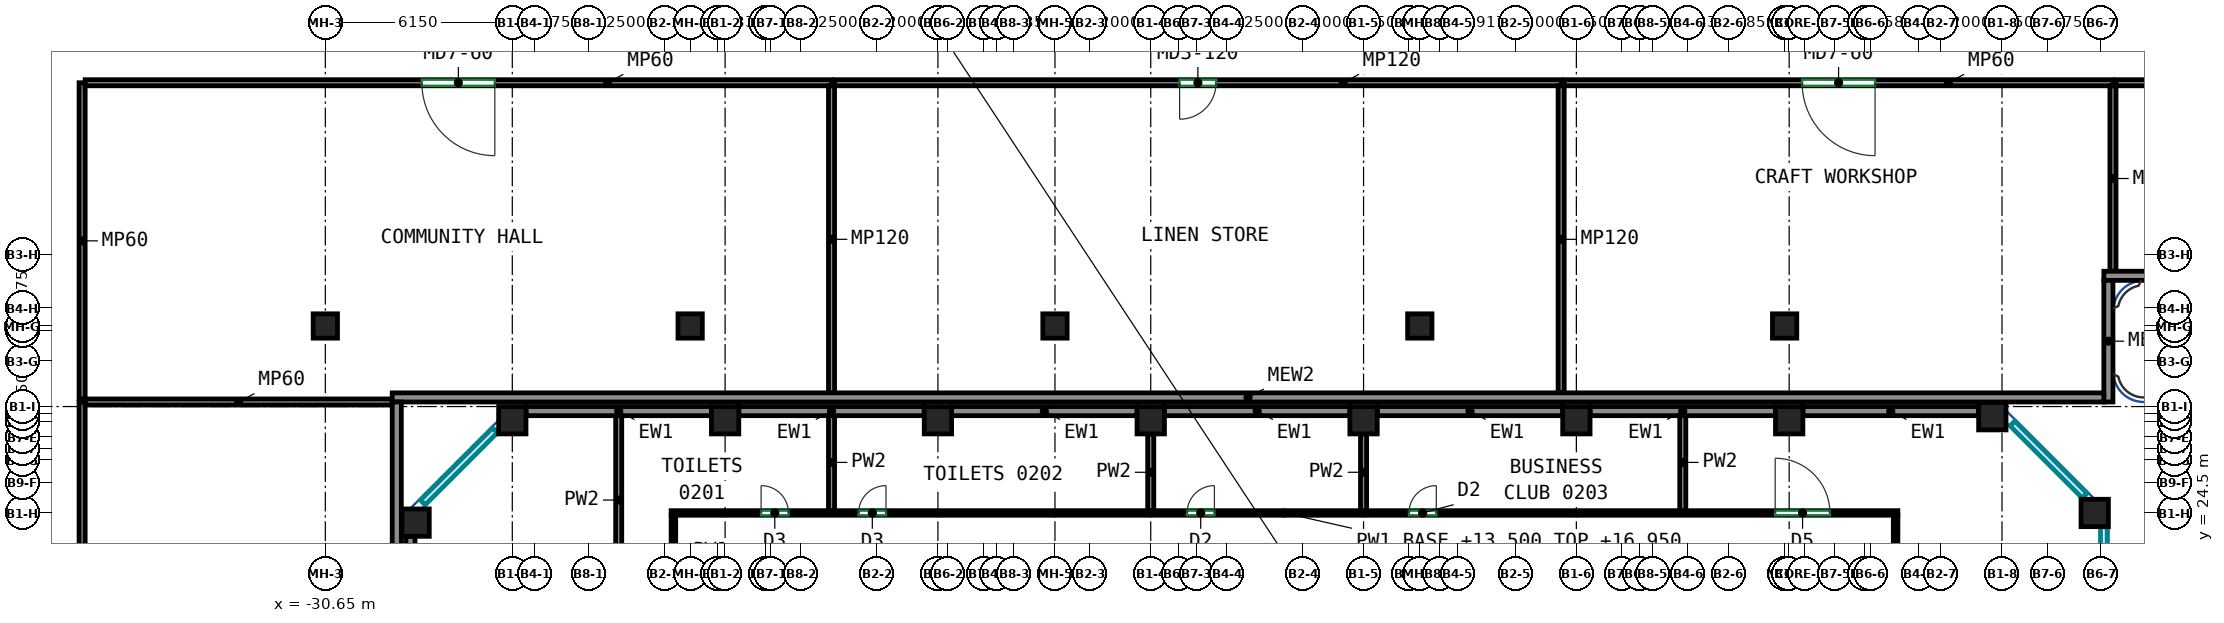
"""IFC4 building model, lengths in metres.
Left out: names, types, materials, properties, quantities, classifications, styles, units other than length and angle.
Written with IfcOpenShell. Run it as: python <this file> out.ifc"""

import sys

from ifc_helpers import new_model, si_unit, direction, frame, frame_2d, origin, origin_2d, place, context, subcontext, project, spatial, rectangle, extrude, source, transform, mapped, element, fill, save


model = new_model("IFC4")
c1 = context("Model", 3, precision=1e-05, world=origin(), true_north=direction((0.0, 1.0)))
c2 = subcontext(c1, "Body", "Model", "MODEL_VIEW")
j1 = project(units=[si_unit("LENGTHUNIT", "METRE"), si_unit("PLANEANGLEUNIT", "RADIAN")], contexts=[c1])
p1 = place(None, origin())
s1 = spatial("IfcSite", under=j1, at=p1, CompositionType="ELEMENT")
p2 = place(p1, origin())
s2 = spatial("IfcBuilding", under=s1, at=p2, CompositionType="ELEMENT")
p3 = place(p2, frame((0.0, 0.0, 13.5)))
s3 = spatial("IfcBuildingStorey", under=s2, at=p3, CompositionType="ELEMENT", Elevation=13.5)
m1 = source(origin(), c2, "Body", "SweptSolid", [
    extrude(rectangle(XDim=0.9, YDim=0.9, at=origin_2d()), origin(), (0.0, 0.0, 1.0), 4.1),
])
for number, where, z_axis, x_axis in (
    (1, (-27.682, 24.182, 0.0), (0.0, 0.0, 1.0), (1.0, 0.0, 0.0)),
    (2, (-24.5, 27.55, 0.0), (0.0, 0.0, 1.0), (1.0, 0.0, 0.0)),
    (3, (-17.5, 27.55, 0.0), (0.0, 0.0, 1.0), (1.0, 0.0, 0.0)),
    (4, (-10.5, 27.55, 0.0), (0.0, 0.0, 1.0), (1.0, 0.0, 0.0)),
    (5, (-3.5, 27.55, 0.0), (0.0, 0.0, 1.0), (1.0, 0.0, 0.0)),
    (6, (3.5, 27.55, 0.0), (0.0, 0.0, 1.0), (1.0, 0.0, 0.0)),
    (7, (10.5, 27.55, 0.0), (0.0, 0.0, 1.0), (1.0, 0.0, 0.0)),
    (8, (17.5, 27.55, 0.0), (0.0, 0.0, 1.0), (1.0, 0.0, 0.0)),
    (9, (24.182, 27.682, 0.0), (0.0, 0.0, 1.0), (1.0, 0.0, 0.0)),
    (10, (27.55, 24.5, 0.0), (0.0, 0.0, 1.0), (1.0, 0.0, 0.0)),
):
    element("IfcColumn", number, at=place(p3, frame(where, z_axis=z_axis, x_axis=x_axis)), inside=s3, PredefinedType="COLUMN", context=c2, shape_type="MappedRepresentation", body=[
        mapped(m1, transform((0.0, 0.0, 0.0))),
    ])
m2 = source(origin(), c2, "Body", "SweptSolid", [
    extrude(rectangle(XDim=0.8, YDim=0.8, at=origin_2d()), origin(), (0.0, 0.0, 1.0), 4.1),
])
for number, where, z_axis, x_axis in (
    (11, (-30.65, 30.65, 0.0), (0.0, 0.0, 1.0), (1.0, 0.0, 0.0)),
    (12, (-18.65, 30.65, 0.0), (0.0, 0.0, 1.0), (1.0, 0.0, 0.0)),
    (13, (-6.65, 30.65, 0.0), (0.0, 0.0, 1.0), (1.0, 0.0, 0.0)),
    (14, (5.35, 30.65, 0.0), (0.0, 0.0, 1.0), (1.0, 0.0, 0.0)),
    (15, (17.35, 30.65, 0.0), (0.0, 0.0, 1.0), (1.0, 0.0, 0.0)),
):
    element("IfcColumn", number, at=place(p3, frame(where, z_axis=z_axis, x_axis=x_axis)), inside=s3, PredefinedType="COLUMN", context=c2, shape_type="MappedRepresentation", body=[
        mapped(m2, transform((0.0, 0.0, 0.0))),
    ])
m3 = source(origin(), c2, "Body", "SweptSolid", [
    extrude(rectangle(XDim=5.782, YDim=0.3, at=frame_2d((2.891, 0.0))), origin(), (0.0, 0.0, 1.0), 4.1),
])
p4 = place(p3, frame((23.732, 27.85, 0.0), z_axis=(0.0, 0.0, 1.0), x_axis=(-1.0, 0.0, 0.0)))
e16 = element("IfcWall", 16, at=p4, inside=s3, PredefinedType="SOLIDWALL", context=c2, shape_type="MappedRepresentation", body=[
    mapped(m3, transform((0.0, 0.0, 0.0))),
])
m4 = source(origin(), c2, "Body", "SweptSolid", [
    extrude(rectangle(XDim=6.1, YDim=0.3, at=frame_2d((3.05, 0.0))), origin(), (0.0, 0.0, 1.0), 4.1),
])
for number, where, z_axis, x_axis in (
    (17, (17.05, 27.85, 0.0), (0.0, 0.0, 1.0), (-1.0, 0.0, 0.0)),
    (18, (10.05, 27.85, 0.0), (0.0, 0.0, 1.0), (-1.0, 0.0, 0.0)),
    (19, (3.05, 27.85, 0.0), (0.0, 0.0, 1.0), (-1.0, 0.0, 0.0)),
    (20, (-3.95, 27.85, 0.0), (0.0, 0.0, 1.0), (-1.0, 0.0, 0.0)),
    (21, (-10.95, 27.85, 0.0), (0.0, 0.0, 1.0), (-1.0, 0.0, 0.0)),
    (22, (-17.95, 27.85, 0.0), (0.0, 0.0, 1.0), (-1.0, 0.0, 0.0)),
):
    element("IfcWall", number, at=place(p3, frame(where, z_axis=z_axis, x_axis=x_axis)), inside=s3, PredefinedType="SOLIDWALL", context=c2, shape_type="MappedRepresentation", body=[
        mapped(m4, transform((0.0, 0.0, 0.0))),
    ])
m5 = source(origin(), c2, "Body", "SweptSolid", [
    extrude(rectangle(XDim=15.282, YDim=0.3, at=frame_2d((7.641, 0.0))), origin(), (0.0, 0.0, 1.0), 4.1),
])
p5 = place(p3, frame((-27.85, 23.732, 0.0), z_axis=(0.0, 0.0, 1.0), x_axis=(0.0, -1.0, 0.0)))
e23 = element("IfcWall", 23, at=p5, inside=s3, PredefinedType="SOLIDWALL", context=c2, shape_type="MappedRepresentation", body=[
    mapped(m5, transform((0.0, 0.0, 0.0))),
])
m6 = source(origin(), c2, "Body", "SweptSolid", [
    extrude(rectangle(XDim=27.7, YDim=0.3, at=frame_2d((13.85, 0.0))), origin(), (0.0, 0.0, 1.0), 4.1),
])
p6 = place(p3, frame((55.55, 32.3, 0.0), z_axis=(0.0, 0.0, 1.0), x_axis=(-1.0, 0.0, 0.0)))
e24 = element("IfcWall", 24, at=p6, inside=s3, PredefinedType="SOLIDWALL", context=c2, shape_type="MappedRepresentation", body=[
    mapped(m6, transform((0.0, 0.0, 0.0))),
])
p7 = place(p6, frame((7.11, 0.0, 0.0)))
e25 = element("IfcOpeningElement", 25, at=p7, cuts=e24, PredefinedType="OPENING", context=c2, shape_type="SweptSolid", body=[
    extrude(rectangle(XDim=2.4, YDim=2.4, at=frame_2d((1.2, 1.2))), frame((0.0, 0.16, 0.0), z_axis=(0.0, -1.0, 0.0), x_axis=(1.0, 0.0, 0.0)), (0.0, 0.0, 1.0), 0.32),
])
p8 = place(p6, frame((18.19, 0.0, 0.0)))
e26 = element("IfcOpeningElement", 26, at=p8, cuts=e24, PredefinedType="OPENING", context=c2, shape_type="SweptSolid", body=[
    extrude(rectangle(XDim=2.4, YDim=2.4, at=frame_2d((1.2, 1.2))), frame((0.0, 0.16, 0.0), z_axis=(0.0, -1.0, 0.0), x_axis=(1.0, 0.0, 0.0)), (0.0, 0.0, 1.0), 0.32),
])
p9 = place(p6, frame((2.65, 0.0, 0.9)))
e27 = element("IfcOpeningElement", 27, at=p9, cuts=e24, PredefinedType="OPENING", context=c2, shape_type="SweptSolid", body=[
    extrude(rectangle(XDim=2.4, YDim=1.8, at=frame_2d((1.2, 0.9))), frame((0.0, 0.16, 0.0), z_axis=(0.0, -1.0, 0.0), x_axis=(1.0, 0.0, 0.0)), (0.0, 0.0, 1.0), 0.32),
])
p10 = place(p6, frame((10.65, 0.0, 0.9)))
e28 = element("IfcOpeningElement", 28, at=p10, cuts=e24, PredefinedType="OPENING", context=c2, shape_type="SweptSolid", body=[
    extrude(rectangle(XDim=2.4, YDim=1.8, at=frame_2d((1.2, 0.9))), frame((0.0, 0.16, 0.0), z_axis=(0.0, -1.0, 0.0), x_axis=(1.0, 0.0, 0.0)), (0.0, 0.0, 1.0), 0.32),
])
p11 = place(p6, frame((14.65, 0.0, 0.9)))
e29 = element("IfcOpeningElement", 29, at=p11, cuts=e24, PredefinedType="OPENING", context=c2, shape_type="SweptSolid", body=[
    extrude(rectangle(XDim=2.4, YDim=1.8, at=frame_2d((1.2, 0.9))), frame((0.0, 0.16, 0.0), z_axis=(0.0, -1.0, 0.0), x_axis=(1.0, 0.0, 0.0)), (0.0, 0.0, 1.0), 0.32),
])
p12 = place(p6, frame((22.65, 0.0, 0.9)))
e30 = element("IfcOpeningElement", 30, at=p12, cuts=e24, PredefinedType="OPENING", context=c2, shape_type="SweptSolid", body=[
    extrude(rectangle(XDim=2.4, YDim=1.8, at=frame_2d((1.2, 0.9))), frame((0.0, 0.16, 0.0), z_axis=(0.0, -1.0, 0.0), x_axis=(1.0, 0.0, 0.0)), (0.0, 0.0, 1.0), 0.32),
])
m7 = source(origin(), c2, "Body", "SweptSolid", [
    extrude(rectangle(XDim=4.0, YDim=0.3, at=frame_2d((2.0, 0.0))), origin(), (0.0, 0.0, 1.0), 4.1),
])
p13 = place(p3, frame((28.0, 32.15, 0.0), z_axis=(0.0, 0.0, 1.0), x_axis=(0.0, -1.0, 0.0)))
e31 = element("IfcWall", 31, at=p13, inside=s3, PredefinedType="SOLIDWALL", context=c2, shape_type="MappedRepresentation", body=[
    mapped(m7, transform((0.0, 0.0, 0.0))),
])
m8 = source(origin(), c2, "Body", "SweptSolid", [
    extrude(rectangle(XDim=56.3, YDim=0.3, at=frame_2d((28.15, 0.0))), origin(), (0.0, 0.0, 1.0), 4.1),
])
p14 = place(p3, frame((27.85, 28.3, 0.0), z_axis=(0.0, 0.0, 1.0), x_axis=(-1.0, 0.0, 0.0)))
e32 = element("IfcWall", 32, at=p14, inside=s3, PredefinedType="SOLIDWALL", context=c2, shape_type="MappedRepresentation", body=[
    mapped(m8, transform((0.0, 0.0, 0.0))),
])
m9 = source(origin(), c2, "Body", "SweptSolid", [
    extrude(rectangle(XDim=56.3, YDim=0.3, at=frame_2d((28.15, 0.0))), origin(), (0.0, 0.0, 1.0), 4.1),
])
p15 = place(p3, frame((-28.3, 28.15, 0.0), z_axis=(0.0, 0.0, 1.0), x_axis=(0.0, -1.0, 0.0)))
e33 = element("IfcWall", 33, at=p15, inside=s3, PredefinedType="SOLIDWALL", context=c2, shape_type="MappedRepresentation", body=[
    mapped(m9, transform((0.0, 0.0, 0.0))),
])
p16 = place(p3, frame((-19.2, 22.09, 0.0), z_axis=(0.0, 0.0, 1.0), x_axis=(0.0, 1.0, 0.0)))
e34 = element("IfcWall", 34, at=p16, inside=s3, PredefinedType="PARTITIONING", context=c2, shape_type="SweptSolid", body=[
    extrude(rectangle(XDim=2.335, YDim=0.15, at=frame_2d((1.167, 0.0))), origin(), (0.0, 0.0, 1.0), 4.1),
])
p17 = place(p3, frame((-19.275, 24.5, 0.0), z_axis=(0.0, 0.0, 1.0), x_axis=(1.0, 0.0, 0.0)))
e35 = element("IfcWall", 35, at=p17, inside=s3, PredefinedType="PARTITIONING", context=c2, shape_type="SweptSolid", body=[
    extrude(rectangle(XDim=40.35, YDim=0.15, at=frame_2d((20.175, 0.0))), origin(), (0.0, 0.0, 1.0), 3.45),
])
p18 = place(p17, frame((2.959, 0.0, 0.0)))
e36 = element("IfcOpeningElement", 36, at=p18, cuts=e35, PredefinedType="OPENING", context=c2, shape_type="SweptSolid", body=[
    extrude(rectangle(XDim=0.9, YDim=2.1, at=frame_2d((0.45, 1.05))), frame((0.0, 0.085, 0.0), z_axis=(0.0, -1.0, 0.0), x_axis=(1.0, 0.0, 0.0)), (0.0, 0.0, 1.0), 0.17),
])
p19 = place(p17, frame((6.167, 0.0, 0.0)))
e37 = element("IfcOpeningElement", 37, at=p19, cuts=e35, PredefinedType="OPENING", context=c2, shape_type="SweptSolid", body=[
    extrude(rectangle(XDim=0.9, YDim=2.1, at=frame_2d((0.45, 1.05))), frame((0.0, 0.085, 0.0), z_axis=(0.0, -1.0, 0.0), x_axis=(1.0, 0.0, 0.0)), (0.0, 0.0, 1.0), 0.17),
])
p20 = place(p17, frame((16.969, 0.0, 0.0)))
e38 = element("IfcOpeningElement", 38, at=p20, cuts=e35, PredefinedType="OPENING", context=c2, shape_type="SweptSolid", body=[
    extrude(rectangle(XDim=0.9, YDim=2.1, at=frame_2d((0.45, 1.05))), frame((0.0, 0.085, 0.0), z_axis=(0.0, -1.0, 0.0), x_axis=(1.0, 0.0, 0.0)), (0.0, 0.0, 1.0), 0.17),
])
p21 = place(p17, frame((24.268, 0.0, 0.0)))
e39 = element("IfcOpeningElement", 39, at=p21, cuts=e35, PredefinedType="OPENING", context=c2, shape_type="SweptSolid", body=[
    extrude(rectangle(XDim=0.9, YDim=2.1, at=frame_2d((0.45, 1.05))), frame((0.0, 0.085, 0.0), z_axis=(0.0, -1.0, 0.0), x_axis=(1.0, 0.0, 0.0)), (0.0, 0.0, 1.0), 0.17),
])
p22 = place(p17, frame((36.315, 0.0, 0.0)))
e40 = element("IfcOpeningElement", 40, at=p22, cuts=e35, PredefinedType="OPENING", context=c2, shape_type="SweptSolid", body=[
    extrude(rectangle(XDim=1.8, YDim=2.1, at=frame_2d((0.9, 1.05))), frame((0.0, 0.085, 0.0), z_axis=(0.0, -1.0, 0.0), x_axis=(1.0, 0.0, 0.0)), (0.0, 0.0, 1.0), 0.17),
])
p23 = place(p3, frame((21.0, 17.75, 0.0), z_axis=(0.0, 0.0, 1.0), x_axis=(0.0, 1.0, 0.0)))
e41 = element("IfcWall", 41, at=p23, inside=s3, PredefinedType="PARTITIONING", context=c2, shape_type="SweptSolid", body=[
    extrude(rectangle(XDim=6.675, YDim=0.15, at=frame_2d((3.337, 0.0))), origin(), (0.0, 0.0, 1.0), 4.1),
])
p24 = place(p3, frame((-21.0, 22.1, 0.0), z_axis=(0.0, 0.0, 1.0), x_axis=(0.0, 1.0, 0.0)))
e42 = element("IfcWall", 42, at=p24, inside=s3, PredefinedType="PARTITIONING", context=c2, shape_type="SweptSolid", body=[
    extrude(rectangle(XDim=5.65, YDim=0.2, at=frame_2d((2.825, 0.0))), origin(), (0.0, 0.0, 1.0), 4.1),
])
p25 = place(p3, frame((-14.0, 24.576, 0.0), z_axis=(0.0, 0.0, 1.0), x_axis=(0.0, 1.0, 0.0)))
e43 = element("IfcWall", 43, at=p25, inside=s3, PredefinedType="PARTITIONING", context=c2, shape_type="SweptSolid", body=[
    extrude(rectangle(XDim=3.174, YDim=0.2, at=frame_2d((1.587, 0.0))), origin(), (0.0, 0.0, 1.0), 4.1),
])
for number, where, z_axis, x_axis in (
    (44, (-3.5, 24.576, 0.0), (0.0, 0.0, 1.0), (0.0, 1.0, 0.0)),
    (45, (3.5, 24.576, 0.0), (0.0, 0.0, 1.0), (0.0, 1.0, 0.0)),
):
    element("IfcWall", number, at=place(p3, frame(where, z_axis=z_axis, x_axis=x_axis)), inside=s3, PredefinedType="PARTITIONING", context=c2, shape_type="SweptSolid", body=[
        extrude(rectangle(XDim=2.524, YDim=0.2, at=frame_2d((1.262, 0.0))), origin(), (0.0, 0.0, 1.0), 4.1),
    ])
p26 = place(p3, frame((14.0, 24.576, 0.0), z_axis=(0.0, 0.0, 1.0), x_axis=(0.0, 1.0, 0.0)))
e46 = element("IfcWall", 46, at=p26, inside=s3, PredefinedType="PARTITIONING", context=c2, shape_type="SweptSolid", body=[
    extrude(rectangle(XDim=3.174, YDim=0.2, at=frame_2d((1.587, 0.0))), origin(), (0.0, 0.0, 1.0), 4.1),
])
m10 = source(origin(), c2, "Body", "SweptSolid", [
    extrude(rectangle(XDim=18.05, YDim=0.2, at=frame_2d((9.025, 0.0))), origin(), (0.0, 0.0, 1.0), 3.3),
])
p27 = place(p3, frame((-38.65, 28.15, 0.0), z_axis=(0.0, 0.0, 1.0), x_axis=(0.0, -1.0, 0.0)))
e47 = element("IfcWall", 47, at=p27, inside=s3, PredefinedType="PARTITIONING", context=c2, shape_type="MappedRepresentation", body=[
    mapped(m10, transform((0.0, 0.0, 0.0))),
])
p28 = place(p27, frame((7.825, 0.0, 0.0)))
e48 = element("IfcOpeningElement", 48, at=p28, cuts=e47, PredefinedType="OPENING", context=c2, shape_type="SweptSolid", body=[
    extrude(rectangle(XDim=2.4, YDim=2.4, at=frame_2d((1.2, 1.2))), frame((0.0, 0.11, 0.0), z_axis=(0.0, -1.0, 0.0), x_axis=(1.0, 0.0, 0.0)), (0.0, 0.0, 1.0), 0.22),
])
m11 = source(origin(), c2, "Body", "SweptSolid", [
    extrude(rectangle(XDim=10.1, YDim=0.2, at=frame_2d((5.05, 0.0))), origin(), (0.0, 0.0, 1.0), 3.3),
])
p29 = place(p3, frame((-38.55, 28.15, 0.0), z_axis=(0.0, 0.0, 1.0), x_axis=(1.0, 0.0, 0.0)))
e49 = element("IfcWall", 49, at=p29, inside=s3, PredefinedType="PARTITIONING", context=c2, shape_type="MappedRepresentation", body=[
    mapped(m11, transform((0.0, 0.0, 0.0))),
])
m12 = source(origin(), c2, "Body", "SweptSolid", [
    extrude(rectangle(XDim=10.4, YDim=0.2, at=frame_2d((5.2, 0.0))), origin(), (0.0, 0.0, 1.0), 3.3),
])
p30 = place(p3, frame((-38.65, 38.65, 0.0), z_axis=(0.0, 0.0, 1.0), x_axis=(0.0, -1.0, 0.0)))
e50 = element("IfcWall", 50, at=p30, inside=s3, PredefinedType="PARTITIONING", context=c2, shape_type="MappedRepresentation", body=[
    mapped(m12, transform((0.0, 0.0, 0.0))),
])
m13 = source(origin(), c2, "Body", "SweptSolid", [
    extrude(rectangle(XDim=24.55, YDim=0.2, at=frame_2d((12.275, 0.0))), origin(), (0.0, 0.0, 1.0), 3.3),
])
p31 = place(p3, frame((-14.0, 38.65, 0.0), z_axis=(0.0, 0.0, 1.0), x_axis=(-1.0, 0.0, 0.0)))
e51 = element("IfcWall", 51, at=p31, inside=s3, PredefinedType="PARTITIONING", context=c2, shape_type="MappedRepresentation", body=[
    mapped(m13, transform((0.0, 0.0, 0.0))),
])
p32 = place(p31, frame((11.075, 0.0, 0.0)))
e52 = element("IfcOpeningElement", 52, at=p32, cuts=e51, PredefinedType="OPENING", context=c2, shape_type="SweptSolid", body=[
    extrude(rectangle(XDim=2.4, YDim=2.4, at=frame_2d((1.2, 1.2))), frame((0.0, 0.11, 0.0), z_axis=(0.0, -1.0, 0.0), x_axis=(1.0, 0.0, 0.0)), (0.0, 0.0, 1.0), 0.22),
])
p33 = place(p3, frame((-14.0, 38.55, 0.0), z_axis=(0.0, 0.0, 1.0), x_axis=(0.0, -1.0, 0.0)))
e53 = element("IfcWall", 53, at=p33, inside=s3, PredefinedType="PARTITIONING", context=c2, shape_type="MappedRepresentation", body=[
    mapped(m11, transform((0.0, 0.0, 0.0))),
])
m14 = source(origin(), c2, "Body", "SweptSolid", [
    extrude(rectangle(XDim=23.9, YDim=0.2, at=frame_2d((11.95, 0.0))), origin(), (0.0, 0.0, 1.0), 3.3),
])
p34 = place(p3, frame((10.0, 38.65, 0.0), z_axis=(0.0, 0.0, 1.0), x_axis=(-1.0, 0.0, 0.0)))
e54 = element("IfcWall", 54, at=p34, inside=s3, PredefinedType="PARTITIONING", context=c2, shape_type="MappedRepresentation", body=[
    mapped(m14, transform((0.0, 0.0, 0.0))),
])
p35 = place(p34, frame((11.35, 0.0, 0.0)))
e55 = element("IfcOpeningElement", 55, at=p35, cuts=e54, PredefinedType="OPENING", context=c2, shape_type="SweptSolid", body=[
    extrude(rectangle(XDim=1.2, YDim=2.1, at=frame_2d((0.6, 1.05))), frame((0.0, 0.11, 0.0), z_axis=(0.0, -1.0, 0.0), x_axis=(1.0, 0.0, 0.0)), (0.0, 0.0, 1.0), 0.22),
])
p36 = place(p3, frame((10.0, 38.55, 0.0), z_axis=(0.0, 0.0, 1.0), x_axis=(0.0, -1.0, 0.0)))
e56 = element("IfcWall", 56, at=p36, inside=s3, PredefinedType="PARTITIONING", context=c2, shape_type="MappedRepresentation", body=[
    mapped(m11, transform((0.0, 0.0, 0.0))),
])
p37 = place(p3, frame((28.15, 38.65, 0.0), z_axis=(0.0, 0.0, 1.0), x_axis=(-1.0, 0.0, 0.0)))
e57 = element("IfcWall", 57, at=p37, inside=s3, PredefinedType="PARTITIONING", context=c2, shape_type="MappedRepresentation", body=[
    mapped(m10, transform((0.0, 0.0, 0.0))),
])
p38 = place(p37, frame((7.825, 0.0, 0.0)))
e58 = element("IfcOpeningElement", 58, at=p38, cuts=e57, PredefinedType="OPENING", context=c2, shape_type="SweptSolid", body=[
    extrude(rectangle(XDim=2.4, YDim=2.4, at=frame_2d((1.2, 1.2))), frame((0.0, 0.11, 0.0), z_axis=(0.0, -1.0, 0.0), x_axis=(1.0, 0.0, 0.0)), (0.0, 0.0, 1.0), 0.22),
])
m15 = source(origin(), c2, "Body", "SweptSolid", [
    extrude(rectangle(XDim=6.1, YDim=0.2, at=frame_2d((3.05, 0.0))), origin(), (0.0, 0.0, 1.0), 4.1),
])
p39 = place(p3, frame((28.15, 38.55, 0.0), z_axis=(0.0, 0.0, 1.0), x_axis=(0.0, -1.0, 0.0)))
e59 = element("IfcWall", 59, at=p39, inside=s3, PredefinedType="PARTITIONING", context=c2, shape_type="MappedRepresentation", body=[
    mapped(m15, transform((0.0, 0.0, 0.0))),
])
m16 = source(origin(), c2, "Body", "SweptSolid", [
    extrude(rectangle(XDim=27.3, YDim=0.2, at=frame_2d((13.65, 0.0))), origin(), (0.0, 0.0, 1.0), 2.8),
])
p40 = place(p3, frame((55.55, 38.65, 0.0), z_axis=(0.0, 0.0, 1.0), x_axis=(-1.0, 0.0, 0.0)))
e60 = element("IfcWall", 60, at=p40, inside=s3, PredefinedType="PARTITIONING", context=c2, shape_type="MappedRepresentation", body=[
    mapped(m16, transform((0.0, 0.0, 0.0))),
])
p41 = place(p40, frame((12.45, 0.0, 0.0)))
e61 = element("IfcOpeningElement", 61, at=p41, cuts=e60, PredefinedType="OPENING", context=c2, shape_type="SweptSolid", body=[
    extrude(rectangle(XDim=2.4, YDim=2.4, at=frame_2d((1.2, 1.2))), frame((0.0, 0.11, 0.0), z_axis=(0.0, -1.0, 0.0), x_axis=(1.0, 0.0, 0.0)), (0.0, 0.0, 1.0), 0.22),
])
p42 = place(p18, origin())
e62 = element("IfcDoor", 62, at=p42, inside=s3, OperationType="SINGLE_SWING_LEFT", PredefinedType="DOOR", context=c2, shape_type="SweptSolid", body=[
    extrude(rectangle(XDim=0.9, YDim=2.1, at=frame_2d((0.45, 1.05))), frame((0.0, 0.025, 0.0), z_axis=(0.0, -1.0, 0.0), x_axis=(1.0, 0.0, 0.0)), (0.0, 0.0, 1.0), 0.05),
])
fill(e36, e62)
p43 = place(p19, origin())
e63 = element("IfcDoor", 63, at=p43, inside=s3, OperationType="SINGLE_SWING_RIGHT", PredefinedType="DOOR", context=c2, shape_type="SweptSolid", body=[
    extrude(rectangle(XDim=0.9, YDim=2.1, at=frame_2d((0.45, 1.05))), frame((0.0, 0.025, 0.0), z_axis=(0.0, -1.0, 0.0), x_axis=(1.0, 0.0, 0.0)), (0.0, 0.0, 1.0), 0.05),
])
fill(e37, e63)
p44 = place(p20, origin())
e64 = element("IfcDoor", 64, at=p44, inside=s3, OperationType="SINGLE_SWING_RIGHT", PredefinedType="DOOR", context=c2, shape_type="SweptSolid", body=[
    extrude(rectangle(XDim=0.9, YDim=2.1, at=frame_2d((0.45, 1.05))), frame((0.0, 0.025, 0.0), z_axis=(0.0, -1.0, 0.0), x_axis=(1.0, 0.0, 0.0)), (0.0, 0.0, 1.0), 0.05),
])
fill(e38, e64)
p45 = place(p21, origin())
e65 = element("IfcDoor", 65, at=p45, inside=s3, OperationType="SINGLE_SWING_RIGHT", PredefinedType="DOOR", context=c2, shape_type="SweptSolid", body=[
    extrude(rectangle(XDim=0.9, YDim=2.1, at=frame_2d((0.45, 1.05))), frame((0.0, 0.025, 0.0), z_axis=(0.0, -1.0, 0.0), x_axis=(1.0, 0.0, 0.0)), (0.0, 0.0, 1.0), 0.05),
])
fill(e39, e65)
p46 = place(p22, origin())
e66 = element("IfcDoor", 66, at=p46, inside=s3, OperationType="DOUBLE_DOOR_SINGLE_SWING", PredefinedType="DOOR", context=c2, shape_type="SweptSolid", body=[
    extrude(rectangle(XDim=1.8, YDim=2.1, at=frame_2d((0.9, 1.05))), frame((0.0, 0.025, 0.0), z_axis=(0.0, -1.0, 0.0), x_axis=(1.0, 0.0, 0.0)), (0.0, 0.0, 1.0), 0.05),
])
fill(e40, e66)
p47 = place(p32, origin())
e67 = element("IfcDoor", 67, at=p47, inside=s3, OperationType="DOUBLE_DOOR_SINGLE_SWING", PredefinedType="DOOR", context=c2, shape_type="SweptSolid", body=[
    extrude(rectangle(XDim=2.4, YDim=2.4, at=frame_2d((1.2, 1.2))), frame((0.0, 0.025, 0.0), z_axis=(0.0, -1.0, 0.0), x_axis=(1.0, 0.0, 0.0)), (0.0, 0.0, 1.0), 0.05),
])
fill(e52, e67)
p48 = place(p35, origin())
e68 = element("IfcDoor", 68, at=p48, inside=s3, OperationType="SINGLE_SWING_RIGHT", PredefinedType="DOOR", context=c2, shape_type="SweptSolid", body=[
    extrude(rectangle(XDim=1.2, YDim=2.1, at=frame_2d((0.6, 1.05))), frame((0.0, 0.025, 0.0), z_axis=(0.0, -1.0, 0.0), x_axis=(1.0, 0.0, 0.0)), (0.0, 0.0, 1.0), 0.05),
])
fill(e55, e68)
p49 = place(p38, origin())
e69 = element("IfcDoor", 69, at=p49, inside=s3, OperationType="DOUBLE_DOOR_SINGLE_SWING", PredefinedType="DOOR", context=c2, shape_type="SweptSolid", body=[
    extrude(rectangle(XDim=2.4, YDim=2.4, at=frame_2d((1.2, 1.2))), frame((0.0, 0.025, 0.0), z_axis=(0.0, -1.0, 0.0), x_axis=(1.0, 0.0, 0.0)), (0.0, 0.0, 1.0), 0.05),
])
fill(e58, e69)
save(model, sys.argv[1])
